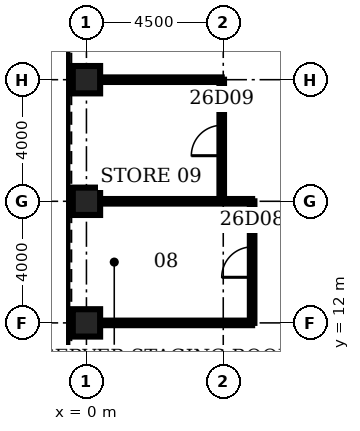
"""IFC4 building model, lengths in metres.
Left out: names, types, materials, properties, quantities, classifications, styles, units other than length and angle.
Written with IfcOpenShell. Run it as: python <this file> out.ifc"""

import sys

from ifc_helpers import new_model, si_unit, direction, frame, frame_2d, origin, origin_2d, place, context, subcontext, project, spatial, rectangle, hollow_rectangle, extrude, element, fill, save


model = new_model("IFC4")
c1 = context("Model", 3, precision=1e-05, world=origin(), true_north=direction((0.0, 1.0)))
c2 = subcontext(c1, "Body", "Model", "MODEL_VIEW")
j1 = project(units=[si_unit("LENGTHUNIT", "METRE"), si_unit("PLANEANGLEUNIT", "RADIAN")], contexts=[c1])
p1 = place(None, origin())
s1 = spatial("IfcSite", under=j1, at=p1, CompositionType="ELEMENT")
p2 = place(p1, origin())
s2 = spatial("IfcBuilding", under=s1, at=p2, CompositionType="ELEMENT")
p3 = place(p2, frame((0.0, 0.0, 121.5)))
s3 = spatial("IfcBuildingStorey", under=s2, at=p3, CompositionType="ELEMENT", Elevation=121.5)
for number, where, z_axis, x_axis in (
    (1, (0.0, 20.0, 0.0), (0.0, 0.0, 1.0), (1.0, 0.0, 0.0)),
    (2, (0.0, 16.0, 0.0), (0.0, 0.0, 1.0), (1.0, 0.0, 0.0)),
    (3, (0.0, 12.0, 0.0), (0.0, 0.0, 1.0), (1.0, 0.0, 0.0)),
):
    element("IfcColumn", number, at=place(p3, frame(where, z_axis=z_axis, x_axis=x_axis)), inside=s3, PredefinedType="COLUMN", context=c2, shape_type="SweptSolid", body=[
        extrude(hollow_rectangle(XDim=0.9, YDim=0.9, WallThickness=0.1, at=origin_2d()), origin(), (0.0, 0.0, 1.0), 4.2),
    ])
for number, where, z_axis, x_axis in (
    (4, (0.45, 12.0, 0.0), (0.0, 0.0, 1.0), (1.0, 0.0, 0.0)),
    (5, (0.45, 16.0, 0.0), (0.0, 0.0, 1.0), (1.0, 0.0, 0.0)),
):
    element("IfcWall", number, at=place(p3, frame(where, z_axis=z_axis, x_axis=x_axis)), inside=s3, PredefinedType="PARTITIONING", context=c2, shape_type="SweptSolid", body=[
        extrude(rectangle(XDim=5.0, YDim=0.15, at=frame_2d((2.5, 0.0))), origin(), (0.0, 0.0, 1.0), 3.0),
    ])
p4 = place(p3, frame((0.45, 20.0, 0.0), z_axis=(0.0, 0.0, 1.0), x_axis=(1.0, 0.0, 0.0)))
e6 = element("IfcWall", 6, at=p4, inside=s3, PredefinedType="PARTITIONING", context=c2, shape_type="SweptSolid", body=[
    extrude(rectangle(XDim=4.0, YDim=0.15, at=frame_2d((2.0, 0.0))), origin(), (0.0, 0.0, 1.0), 3.0),
])
p5 = place(p3, frame((4.45, 16.0, 0.0), z_axis=(0.0, 0.0, 1.0), x_axis=(0.0, 1.0, 0.0)))
e7 = element("IfcWall", 7, at=p5, inside=s3, PredefinedType="PARTITIONING", context=c2, shape_type="SweptSolid", body=[
    extrude(rectangle(XDim=4.0, YDim=0.15, at=frame_2d((2.0, 0.0))), origin(), (0.0, 0.0, 1.0), 3.0),
])
p6 = place(p5, frame((1.5, 0.0, 0.0)))
e8 = element("IfcOpeningElement", 8, at=p6, cuts=e7, PredefinedType="OPENING", context=c2, shape_type="SweptSolid", body=[
    extrude(rectangle(XDim=1.0, YDim=2.1, at=frame_2d((0.5, 1.05))), frame((0.0, 0.085, 0.0), z_axis=(0.0, -1.0, 0.0), x_axis=(1.0, 0.0, 0.0)), (0.0, 0.0, 1.0), 0.17),
])
p7 = place(p3, frame((5.45, 12.0, 0.0), z_axis=(0.0, 0.0, 1.0), x_axis=(0.0, 1.0, 0.0)))
e9 = element("IfcWall", 9, at=p7, inside=s3, PredefinedType="PARTITIONING", context=c2, shape_type="SweptSolid", body=[
    extrude(rectangle(XDim=4.0, YDim=0.15, at=frame_2d((2.0, 0.0))), origin(), (0.0, 0.0, 1.0), 3.0),
])
p8 = place(p7, frame((1.5, 0.0, 0.0)))
e10 = element("IfcOpeningElement", 10, at=p8, cuts=e9, PredefinedType="OPENING", context=c2, shape_type="SweptSolid", body=[
    extrude(rectangle(XDim=1.0, YDim=2.1, at=frame_2d((0.5, 1.05))), frame((0.0, 0.085, 0.0), z_axis=(0.0, -1.0, 0.0), x_axis=(1.0, 0.0, 0.0)), (0.0, 0.0, 1.0), 0.17),
])
p9 = place(p8, origin())
e11 = element("IfcDoor", 11, at=p9, inside=s3, OperationType="SINGLE_SWING_LEFT", PredefinedType="DOOR", context=c2, shape_type="SweptSolid", body=[
    extrude(rectangle(XDim=1.0, YDim=2.1, at=frame_2d((0.5, 1.05))), frame((0.0, 0.025, 0.0), z_axis=(0.0, -1.0, 0.0), x_axis=(1.0, 0.0, 0.0)), (0.0, 0.0, 1.0), 0.05),
])
fill(e10, e11)
p10 = place(p6, origin())
e12 = element("IfcDoor", 12, at=p10, inside=s3, OperationType="SINGLE_SWING_LEFT", PredefinedType="DOOR", context=c2, shape_type="SweptSolid", body=[
    extrude(rectangle(XDim=1.0, YDim=2.1, at=frame_2d((0.5, 1.05))), frame((0.0, 0.025, 0.0), z_axis=(0.0, -1.0, 0.0), x_axis=(1.0, 0.0, 0.0)), (0.0, 0.0, 1.0), 0.05),
])
fill(e8, e12)
save(model, sys.argv[1])
